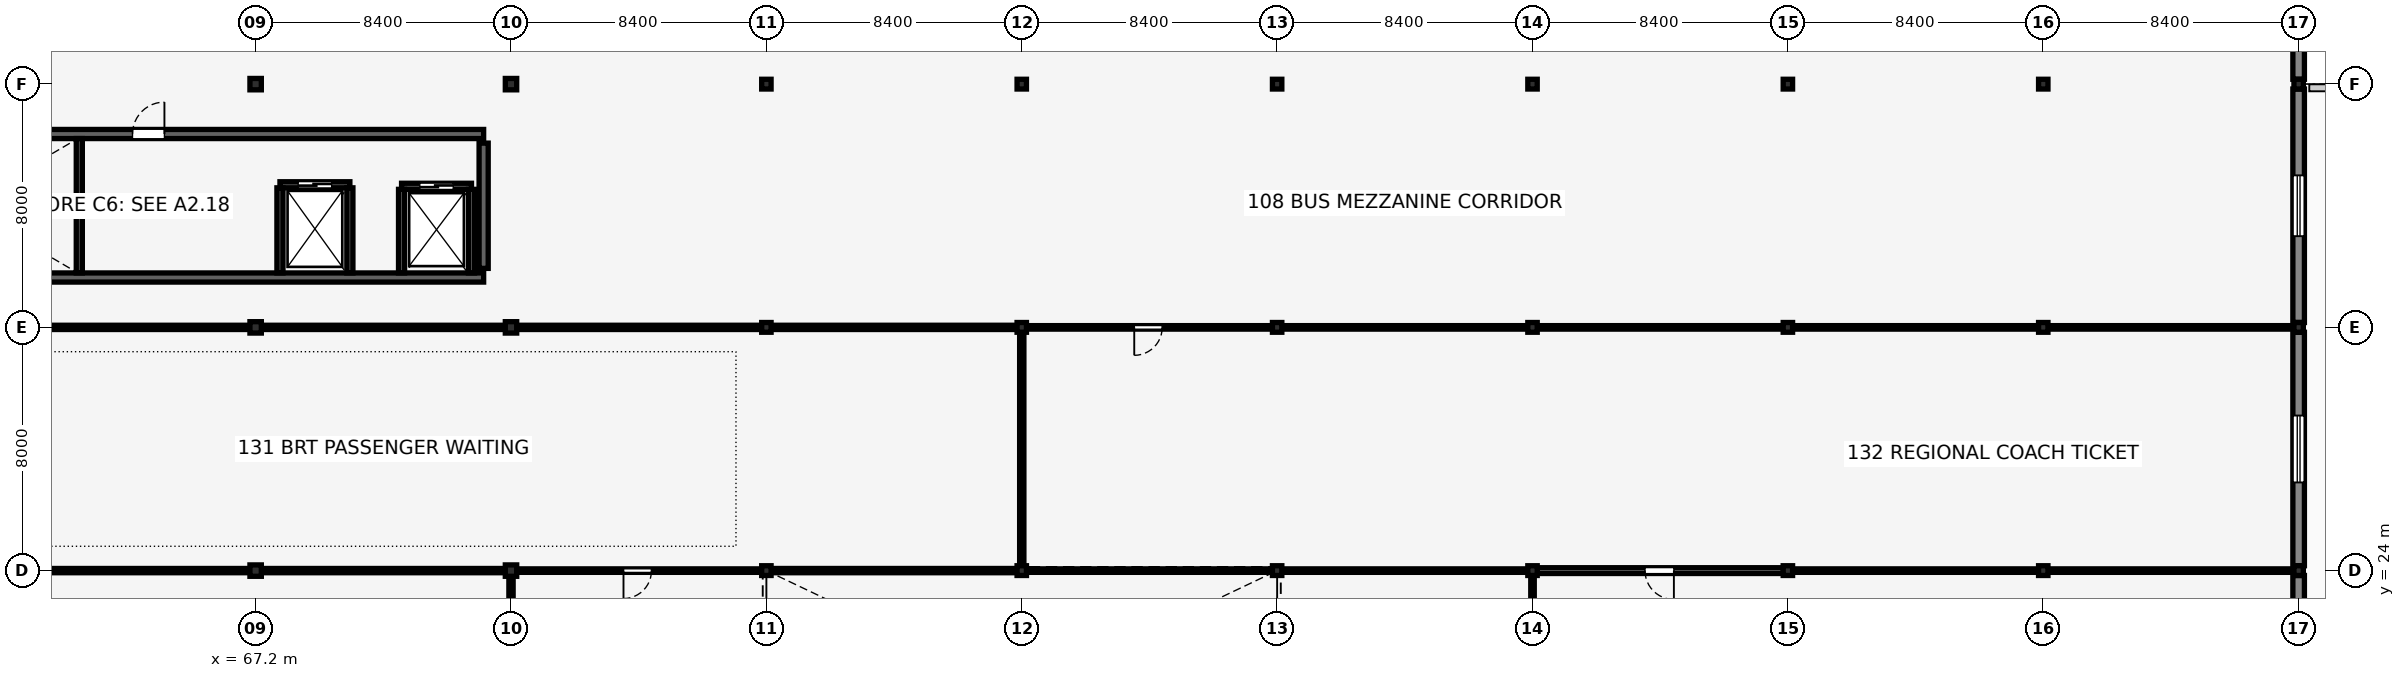
"""IFC4 building model, lengths in metres.
Left out: names, types, materials, properties, quantities, classifications, styles, units other than length and angle.
Written with IfcOpenShell. Run it as: python <this file> out.ifc"""

import sys

from ifc_helpers import new_model, si_unit, direction, frame, frame_2d, origin, origin_2d, place, context, subcontext, project, spatial, rectangle, i_section, extrude, element, fill, save


model = new_model("IFC4")
c1 = context("Model", 3, precision=1e-05, world=origin(), true_north=direction((0.0, 1.0)))
c2 = subcontext(c1, "Body", "Model", "MODEL_VIEW")
j1 = project(units=[si_unit("LENGTHUNIT", "METRE"), si_unit("PLANEANGLEUNIT", "RADIAN")], contexts=[c1])
p1 = place(None, origin())
s1 = spatial("IfcSite", under=j1, at=p1, CompositionType="ELEMENT")
p2 = place(p1, origin())
s2 = spatial("IfcBuilding", under=s1, at=p2, CompositionType="ELEMENT")
p3 = place(p2, frame((0.0, 0.0, 5.44)))
s3 = spatial("IfcBuildingStorey", under=s2, at=p3, CompositionType="ELEMENT", Elevation=5.44)
p4 = place(p3, frame((51.5, 33.64, 0.0), z_axis=(0.0, 0.0, 1.0), x_axis=(1.0, 0.0, 0.0)))
e1 = element("IfcWall", 1, at=p4, inside=s3, PredefinedType="SHEAR", context=c2, shape_type="SweptSolid", body=[
    extrude(rectangle(XDim=23.2, YDim=0.3, at=frame_2d((11.6, 0.0))), origin(), (0.0, 0.0, 1.0), 3.8),
])
p5 = place(p3, frame((51.5, 38.36, 0.0), z_axis=(0.0, 0.0, 1.0), x_axis=(1.0, 0.0, 0.0)))
e2 = element("IfcWall", 2, at=p5, inside=s3, PredefinedType="SHEAR", context=c2, shape_type="SweptSolid", body=[
    extrude(rectangle(XDim=23.2, YDim=0.3, at=frame_2d((11.6, 0.0))), origin(), (0.0, 0.0, 1.0), 3.8),
])
p6 = place(p5, frame((0.45, 0.0, 0.0), z_axis=(0.0, 0.0, 1.0), x_axis=(1.0, 0.0, 0.0)))
e3 = element("IfcOpeningElement", 3, at=p6, cuts=e2, PredefinedType="OPENING", context=c2, shape_type="SweptSolid", body=[
    extrude(rectangle(XDim=1.4, YDim=2.15, at=frame_2d((0.7, 1.075))), frame((0.0, 0.16, 0.0), z_axis=(0.0, -1.0, 0.0), x_axis=(1.0, 0.0, 0.0)), (0.0, 0.0, 1.0), 0.32),
])
p7 = place(p5, frame((11.65, 0.0, 0.0), z_axis=(0.0, 0.0, 1.0), x_axis=(1.0, 0.0, 0.0)))
e4 = element("IfcOpeningElement", 4, at=p7, cuts=e2, PredefinedType="OPENING", context=c2, shape_type="SweptSolid", body=[
    extrude(rectangle(XDim=1.05, YDim=2.15, at=frame_2d((0.525, 1.075))), frame((0.0, 0.16, 0.0), z_axis=(0.0, -1.0, 0.0), x_axis=(1.0, 0.0, 0.0)), (0.0, 0.0, 1.0), 0.32),
])
p8 = place(p3, frame((74.7, 33.94, 0.0), z_axis=(0.0, 0.0, 1.0), x_axis=(0.0, 1.0, 0.0)))
e5 = element("IfcWall", 5, at=p8, inside=s3, PredefinedType="SHEAR", context=c2, shape_type="SweptSolid", body=[
    extrude(rectangle(XDim=4.12, YDim=0.3, at=frame_2d((2.06, 0.0))), origin(), (0.0, 0.0, 1.0), 3.8),
])
for number, where, z_axis, x_axis in (
    (6, (67.2, 24.0, 0.0), (0.0, 0.0, 1.0), (1.0, 0.0, 0.0)),
    (7, (67.2, 32.0, 0.0), (0.0, 0.0, 1.0), (1.0, 0.0, 0.0)),
    (8, (67.2, 40.0, 0.0), (0.0, 0.0, 1.0), (1.0, 0.0, 0.0)),
    (9, (75.6, 24.0, 0.0), (0.0, 0.0, 1.0), (1.0, 0.0, 0.0)),
    (10, (75.6, 32.0, 0.0), (0.0, 0.0, 1.0), (1.0, 0.0, 0.0)),
    (11, (75.6, 40.0, 0.0), (0.0, 0.0, 1.0), (1.0, 0.0, 0.0)),
):
    element("IfcColumn", number, at=place(p3, frame(where, z_axis=z_axis, x_axis=x_axis)), inside=s3, PredefinedType="COLUMN", context=c2, shape_type="SweptSolid", body=[
        extrude(i_section(OverallWidth=0.375, OverallDepth=0.375, WebThickness=0.017, FlangeThickness=0.027, FilletRadius=0.015, at=origin_2d()), origin(), (0.0, 0.0, 1.0), 3.8),
    ])
for number, where, z_axis, x_axis in (
    (12, (84.0, 24.0, 0.0), (0.0, 0.0, 1.0), (1.0, 0.0, 0.0)),
    (13, (84.0, 32.0, 0.0), (0.0, 0.0, 1.0), (1.0, 0.0, 0.0)),
    (14, (84.0, 40.0, 0.0), (0.0, 0.0, 1.0), (1.0, 0.0, 0.0)),
    (15, (92.4, 24.0, 0.0), (0.0, 0.0, 1.0), (1.0, 0.0, 0.0)),
    (16, (92.4, 32.0, 0.0), (0.0, 0.0, 1.0), (1.0, 0.0, 0.0)),
    (17, (92.4, 40.0, 0.0), (0.0, 0.0, 1.0), (1.0, 0.0, 0.0)),
    (18, (100.8, 24.0, 0.0), (0.0, 0.0, 1.0), (1.0, 0.0, 0.0)),
    (19, (100.8, 32.0, 0.0), (0.0, 0.0, 1.0), (1.0, 0.0, 0.0)),
    (20, (100.8, 40.0, 0.0), (0.0, 0.0, 1.0), (1.0, 0.0, 0.0)),
    (21, (109.2, 24.0, 0.0), (0.0, 0.0, 1.0), (1.0, 0.0, 0.0)),
    (22, (109.2, 32.0, 0.0), (0.0, 0.0, 1.0), (1.0, 0.0, 0.0)),
    (23, (109.2, 40.0, 0.0), (0.0, 0.0, 1.0), (1.0, 0.0, 0.0)),
    (24, (117.6, 24.0, 0.0), (0.0, 0.0, 1.0), (1.0, 0.0, 0.0)),
    (25, (117.6, 32.0, 0.0), (0.0, 0.0, 1.0), (1.0, 0.0, 0.0)),
    (26, (117.6, 40.0, 0.0), (0.0, 0.0, 1.0), (1.0, 0.0, 0.0)),
    (27, (126.0, 24.0, 0.0), (0.0, 0.0, 1.0), (1.0, 0.0, 0.0)),
    (28, (126.0, 32.0, 0.0), (0.0, 0.0, 1.0), (1.0, 0.0, 0.0)),
    (29, (126.0, 40.0, 0.0), (0.0, 0.0, 1.0), (1.0, 0.0, 0.0)),
    (30, (134.4, 24.0, 0.0), (0.0, 0.0, 1.0), (1.0, 0.0, 0.0)),
    (31, (134.4, 32.0, 0.0), (0.0, 0.0, 1.0), (1.0, 0.0, 0.0)),
    (32, (134.4, 40.0, 0.0), (0.0, 0.0, 1.0), (1.0, 0.0, 0.0)),
):
    element("IfcColumn", number, at=place(p3, frame(where, z_axis=z_axis, x_axis=x_axis)), inside=s3, PredefinedType="COLUMN", context=c2, shape_type="SweptSolid", body=[
        extrude(i_section(OverallWidth=0.309, OverallDepth=0.321, WebThickness=0.014, FlangeThickness=0.022, FilletRadius=0.015, at=origin_2d()), origin(), (0.0, 0.0, 1.0), 3.8),
    ])
p9 = place(p3, frame((134.4, 40.16, 0.0), z_axis=(0.0, 0.0, 1.0), x_axis=(0.0, 1.0, 0.0)))
e33 = element("IfcWall", 33, at=p9, inside=s3, PredefinedType="SOLIDWALL", context=c2, shape_type="SweptSolid", body=[
    extrude(rectangle(XDim=7.679, YDim=0.38, at=frame_2d((3.84, 0.0))), origin(), (0.0, 0.0, 1.0), 3.442),
])
p10 = place(p9, frame((2.44, 0.0, 0.9), z_axis=(0.0, 0.0, 1.0), x_axis=(1.0, 0.0, 0.0)))
e34 = element("IfcOpeningElement", 34, at=p10, cuts=e33, PredefinedType="OPENING", context=c2, shape_type="SweptSolid", body=[
    extrude(rectangle(XDim=2.8, YDim=1.6, at=frame_2d((1.4, 0.8))), frame((0.0, 0.2, 0.0), z_axis=(0.0, -1.0, 0.0), x_axis=(1.0, 0.0, 0.0)), (0.0, 0.0, 1.0), 0.4),
])
p11 = place(p3, frame((134.4, 16.16, 0.0), z_axis=(0.0, 0.0, 1.0), x_axis=(0.0, 1.0, 0.0)))
e35 = element("IfcWall", 35, at=p11, inside=s3, PredefinedType="SOLIDWALL", context=c2, shape_type="SweptSolid", body=[
    extrude(rectangle(XDim=7.679, YDim=0.38, at=frame_2d((3.84, 0.0))), origin(), (0.0, 0.0, 1.0), 3.442),
])
p12 = place(p11, frame((2.64, 0.0, 0.9), z_axis=(0.0, 0.0, 1.0), x_axis=(1.0, 0.0, 0.0)))
e36 = element("IfcOpeningElement", 36, at=p12, cuts=e35, PredefinedType="OPENING", context=c2, shape_type="SweptSolid", body=[
    extrude(rectangle(XDim=2.4, YDim=1.5, at=frame_2d((1.2, 0.75))), frame((0.0, 0.2, 0.0), z_axis=(0.0, -1.0, 0.0), x_axis=(1.0, 0.0, 0.0)), (0.0, 0.0, 1.0), 0.4),
])
p13 = place(p3, frame((134.4, 24.16, 0.0), z_axis=(0.0, 0.0, 1.0), x_axis=(0.0, 1.0, 0.0)))
e37 = element("IfcWall", 37, at=p13, inside=s3, PredefinedType="SOLIDWALL", context=c2, shape_type="SweptSolid", body=[
    extrude(rectangle(XDim=7.679, YDim=0.38, at=frame_2d((3.84, 0.0))), origin(), (0.0, 0.0, 1.0), 3.442),
])
p14 = place(p13, frame((2.74, 0.0, 0.9), z_axis=(0.0, 0.0, 1.0), x_axis=(1.0, 0.0, 0.0)))
e38 = element("IfcOpeningElement", 38, at=p14, cuts=e37, PredefinedType="OPENING", context=c2, shape_type="SweptSolid", body=[
    extrude(rectangle(XDim=2.2, YDim=1.5, at=frame_2d((1.1, 0.75))), frame((0.0, 0.2, 0.0), z_axis=(0.0, -1.0, 0.0), x_axis=(1.0, 0.0, 0.0)), (0.0, 0.0, 1.0), 0.4),
])
p15 = place(p3, frame((134.4, 32.16, 0.0), z_axis=(0.0, 0.0, 1.0), x_axis=(0.0, 1.0, 0.0)))
e39 = element("IfcWall", 39, at=p15, inside=s3, PredefinedType="SOLIDWALL", context=c2, shape_type="SweptSolid", body=[
    extrude(rectangle(XDim=7.679, YDim=0.38, at=frame_2d((3.84, 0.0))), origin(), (0.0, 0.0, 1.0), 3.442),
])
p16 = place(p15, frame((2.84, 0.0, 0.9), z_axis=(0.0, 0.0, 1.0), x_axis=(1.0, 0.0, 0.0)))
e40 = element("IfcOpeningElement", 40, at=p16, cuts=e39, PredefinedType="OPENING", context=c2, shape_type="SweptSolid", body=[
    extrude(rectangle(XDim=2.0, YDim=1.5, at=frame_2d((1.0, 0.75))), frame((0.0, 0.2, 0.0), z_axis=(0.0, -1.0, 0.0), x_axis=(1.0, 0.0, 0.0)), (0.0, 0.0, 1.0), 0.4),
])
p17 = place(p3, frame((134.75, 39.88, 0.0), z_axis=(0.0, 0.0, 1.0), x_axis=(1.0, 0.0, 0.0)))
e41 = element("IfcWall", 41, at=p17, inside=s3, PredefinedType="PARAPET", context=c2, shape_type="SweptSolid", body=[
    extrude(rectangle(XDim=16.33, YDim=0.23, at=frame_2d((8.165, 0.0))), origin(), (0.0, 0.0, 1.0), 1.05),
])
p18 = place(p3, frame((61.4, 33.79, 0.0), z_axis=(0.0, 0.0, 1.0), x_axis=(0.0, 1.0, 0.0)))
e42 = element("IfcWall", 42, at=p18, inside=s3, PredefinedType="SHEAR", context=c2, shape_type="SweptSolid", body=[
    extrude(rectangle(XDim=4.42, YDim=0.2, at=frame_2d((2.21, 0.0))), origin(), (0.0, 0.0, 1.0), 3.8),
])
p19 = place(p3, frame((68.0, 36.69, 0.0), z_axis=(0.0, 0.0, 1.0), x_axis=(1.0, 0.0, 0.0)))
e43 = element("IfcWall", 43, at=p19, inside=s3, PredefinedType="SHEAR", context=c2, shape_type="SweptSolid", body=[
    extrude(rectangle(XDim=2.3, YDim=0.2, at=frame_2d((1.15, 0.0))), origin(), (0.0, 0.0, 1.0), 3.8),
])
p20 = place(p19, frame((0.6, 0.0, 0.0), z_axis=(0.0, 0.0, 1.0), x_axis=(1.0, 0.0, 0.0)))
e44 = element("IfcOpeningElement", 44, at=p20, cuts=e43, PredefinedType="OPENING", context=c2, shape_type="SweptSolid", body=[
    extrude(rectangle(XDim=1.1, YDim=2.15, at=frame_2d((0.55, 1.075))), frame((0.0, 0.11, 0.0), z_axis=(0.0, -1.0, 0.0), x_axis=(1.0, 0.0, 0.0)), (0.0, 0.0, 1.0), 0.22),
])
for number, where, z_axis, x_axis in (
    (45, (68.0, 33.79, 0.0), (0.0, 0.0, 1.0), (0.0, 1.0, 0.0)),
    (46, (70.3, 33.79, 0.0), (0.0, 0.0, 1.0), (0.0, 1.0, 0.0)),
):
    element("IfcWall", number, at=place(p3, frame(where, z_axis=z_axis, x_axis=x_axis)), inside=s3, PredefinedType="SHEAR", context=c2, shape_type="SweptSolid", body=[
        extrude(rectangle(XDim=2.8, YDim=0.2, at=frame_2d((1.4, 0.0))), origin(), (0.0, 0.0, 1.0), 3.8),
    ])
p21 = place(p3, frame((72.0, 36.64, 0.0), z_axis=(0.0, 0.0, 1.0), x_axis=(1.0, 0.0, 0.0)))
e47 = element("IfcWall", 47, at=p21, inside=s3, PredefinedType="SHEAR", context=c2, shape_type="SweptSolid", body=[
    extrude(rectangle(XDim=2.3, YDim=0.2, at=frame_2d((1.15, 0.0))), origin(), (0.0, 0.0, 1.0), 3.8),
])
p22 = place(p21, frame((0.6, 0.0, 0.0), z_axis=(0.0, 0.0, 1.0), x_axis=(1.0, 0.0, 0.0)))
e48 = element("IfcOpeningElement", 48, at=p22, cuts=e47, PredefinedType="OPENING", context=c2, shape_type="SweptSolid", body=[
    extrude(rectangle(XDim=1.1, YDim=2.15, at=frame_2d((0.55, 1.075))), frame((0.0, 0.11, 0.0), z_axis=(0.0, -1.0, 0.0), x_axis=(1.0, 0.0, 0.0)), (0.0, 0.0, 1.0), 0.22),
])
for number, where, z_axis, x_axis in (
    (49, (72.0, 33.79, 0.0), (0.0, 0.0, 1.0), (0.0, 1.0, 0.0)),
    (50, (74.3, 33.79, 0.0), (0.0, 0.0, 1.0), (0.0, 1.0, 0.0)),
):
    element("IfcWall", number, at=place(p3, frame(where, z_axis=z_axis, x_axis=x_axis)), inside=s3, PredefinedType="SHEAR", context=c2, shape_type="SweptSolid", body=[
        extrude(rectangle(XDim=2.75, YDim=0.2, at=frame_2d((1.375, 0.0))), origin(), (0.0, 0.0, 1.0), 3.8),
    ])
p23 = place(p3, frame((92.545, 32.0, 0.0), z_axis=(0.0, 0.0, 1.0), x_axis=(1.0, 0.0, 0.0)))
e51 = element("IfcWall", 51, at=p23, inside=s3, PredefinedType="PARTITIONING", context=c2, shape_type="SweptSolid", body=[
    extrude(rectangle(XDim=8.111, YDim=0.115, at=frame_2d((4.055, 0.0))), origin(), (0.0, 0.0, 1.0), 3.26),
])
p24 = place(p23, frame((4.475, 0.0, 0.0), z_axis=(0.0, 0.0, 1.0), x_axis=(-1.0, 0.0, 0.0)))
e52 = element("IfcOpeningElement", 52, at=p24, cuts=e51, PredefinedType="OPENING", context=c2, shape_type="SweptSolid", body=[
    extrude(rectangle(XDim=0.92, YDim=2.12, at=frame_2d((0.46, 1.06))), frame((0.0, 0.067, 0.0), z_axis=(0.0, -1.0, 0.0), x_axis=(1.0, 0.0, 0.0)), (0.0, 0.0, 1.0), 0.135),
])
p25 = place(p3, frame((75.777, 24.0, 0.0), z_axis=(0.0, 0.0, 1.0), x_axis=(1.0, 0.0, 0.0)))
e53 = element("IfcWall", 53, at=p25, inside=s3, PredefinedType="PARTITIONING", context=c2, shape_type="SweptSolid", body=[
    extrude(rectangle(XDim=8.078, YDim=0.115, at=frame_2d((4.039, 0.0))), origin(), (0.0, 0.0, 1.0), 3.26),
])
p26 = place(p25, frame((4.443, 0.0, 0.0), z_axis=(0.0, 0.0, 1.0), x_axis=(-1.0, 0.0, 0.0)))
e54 = element("IfcOpeningElement", 54, at=p26, cuts=e53, PredefinedType="OPENING", context=c2, shape_type="SweptSolid", body=[
    extrude(rectangle(XDim=0.92, YDim=2.12, at=frame_2d((0.46, 1.06))), frame((0.0, 0.067, 0.0), z_axis=(0.0, -1.0, 0.0), x_axis=(1.0, 0.0, 0.0)), (0.0, 0.0, 1.0), 0.135),
])
p27 = place(p3, frame((109.344, 24.0, 0.0), z_axis=(0.0, 0.0, 1.0), x_axis=(1.0, 0.0, 0.0)))
e55 = element("IfcWall", 55, at=p27, inside=s3, PredefinedType="PLUMBINGWALL", context=c2, shape_type="SweptSolid", body=[
    extrude(rectangle(XDim=8.111, YDim=0.19, at=frame_2d((4.055, 0.0))), origin(), (0.0, 0.0, 1.0), 3.26),
])
p28 = place(p27, frame((4.505, 0.0, 0.0), z_axis=(0.0, 0.0, 1.0), x_axis=(-1.0, 0.0, 0.0)))
e56 = element("IfcOpeningElement", 56, at=p28, cuts=e55, PredefinedType="OPENING", context=c2, shape_type="SweptSolid", body=[
    extrude(rectangle(XDim=0.95, YDim=2.15, at=frame_2d((0.475, 1.075))), frame((0.0, 0.105, 0.0), z_axis=(0.0, -1.0, 0.0), x_axis=(1.0, 0.0, 0.0)), (0.0, 0.0, 1.0), 0.21),
])
for number, where, z_axis, x_axis in (
    (57, (58.977, 32.0, 0.0), (0.0, 0.0, 1.0), (1.0, 0.0, 0.0)),
    (58, (67.377, 32.0, 0.0), (0.0, 0.0, 1.0), (1.0, 0.0, 0.0)),
):
    element("IfcWall", number, at=place(p3, frame(where, z_axis=z_axis, x_axis=x_axis)), inside=s3, PredefinedType="PARTITIONING", context=c2, shape_type="SweptSolid", body=[
        extrude(rectangle(XDim=8.045, YDim=0.14, at=frame_2d((4.023, 0.0))), origin(), (0.0, 0.0, 1.0), 3.26),
    ])
p29 = place(p3, frame((75.777, 32.0, 0.0), z_axis=(0.0, 0.0, 1.0), x_axis=(1.0, 0.0, 0.0)))
e59 = element("IfcWall", 59, at=p29, inside=s3, PredefinedType="PARTITIONING", context=c2, shape_type="SweptSolid", body=[
    extrude(rectangle(XDim=8.078, YDim=0.14, at=frame_2d((4.039, 0.0))), origin(), (0.0, 0.0, 1.0), 3.26),
])
p30 = place(p3, frame((84.145, 32.0, 0.0), z_axis=(0.0, 0.0, 1.0), x_axis=(1.0, 0.0, 0.0)))
e60 = element("IfcWall", 60, at=p30, inside=s3, PredefinedType="PARTITIONING", context=c2, shape_type="SweptSolid", body=[
    extrude(rectangle(XDim=8.111, YDim=0.14, at=frame_2d((4.055, 0.0))), origin(), (0.0, 0.0, 1.0), 3.26),
])
for number, where, z_axis, x_axis in (
    (61, (58.977, 24.0, 0.0), (0.0, 0.0, 1.0), (1.0, 0.0, 0.0)),
    (62, (67.377, 24.0, 0.0), (0.0, 0.0, 1.0), (1.0, 0.0, 0.0)),
):
    element("IfcWall", number, at=place(p3, frame(where, z_axis=z_axis, x_axis=x_axis)), inside=s3, PredefinedType="PARTITIONING", context=c2, shape_type="SweptSolid", body=[
        extrude(rectangle(XDim=8.045, YDim=0.14, at=frame_2d((4.023, 0.0))), origin(), (0.0, 0.0, 1.0), 3.26),
    ])
p31 = place(p3, frame((84.145, 24.0, 0.0), z_axis=(0.0, 0.0, 1.0), x_axis=(1.0, 0.0, 0.0)))
e63 = element("IfcWall", 63, at=p31, inside=s3, PredefinedType="PARTITIONING", context=c2, shape_type="SweptSolid", body=[
    extrude(rectangle(XDim=8.111, YDim=0.14, at=frame_2d((4.055, 0.0))), origin(), (0.0, 0.0, 1.0), 3.26),
])
p32 = place(p3, frame((92.4, 24.15, 0.0), z_axis=(0.0, 0.0, 1.0), x_axis=(0.0, 1.0, 0.0)))
e64 = element("IfcWall", 64, at=p32, inside=s3, PredefinedType="PARTITIONING", context=c2, shape_type="SweptSolid", body=[
    extrude(rectangle(XDim=7.699, YDim=0.14, at=frame_2d((3.85, 0.0))), origin(), (0.0, 0.0, 1.0), 3.337),
])
for number, where, z_axis, x_axis in (
    (65, (100.945, 32.0, 0.0), (0.0, 0.0, 1.0), (1.0, 0.0, 0.0)),
    (66, (109.344, 32.0, 0.0), (0.0, 0.0, 1.0), (1.0, 0.0, 0.0)),
    (67, (117.745, 32.0, 0.0), (0.0, 0.0, 1.0), (1.0, 0.0, 0.0)),
    (68, (126.145, 32.0, 0.0), (0.0, 0.0, 1.0), (1.0, 0.0, 0.0)),
    (69, (92.545, 24.0, 0.0), (0.0, 0.0, 1.0), (1.0, 0.0, 0.0)),
    (70, (100.945, 24.0, 0.0), (0.0, 0.0, 1.0), (1.0, 0.0, 0.0)),
    (71, (117.745, 24.0, 0.0), (0.0, 0.0, 1.0), (1.0, 0.0, 0.0)),
    (72, (126.145, 24.0, 0.0), (0.0, 0.0, 1.0), (1.0, 0.0, 0.0)),
):
    element("IfcWall", number, at=place(p3, frame(where, z_axis=z_axis, x_axis=x_axis)), inside=s3, PredefinedType="PARTITIONING", context=c2, shape_type="SweptSolid", body=[
        extrude(rectangle(XDim=8.111, YDim=0.115, at=frame_2d((4.055, 0.0))), origin(), (0.0, 0.0, 1.0), 3.26),
    ])
p33 = place(p3, frame((75.6, 16.15, 0.0), z_axis=(0.0, 0.0, 1.0), x_axis=(0.0, 1.0, 0.0)))
e73 = element("IfcWall", 73, at=p33, inside=s3, PredefinedType="PARTITIONING", context=c2, shape_type="SweptSolid", body=[
    extrude(rectangle(XDim=7.672, YDim=0.14, at=frame_2d((3.836, 0.0))), origin(), (0.0, 0.0, 1.0), 3.337),
])
p34 = place(p3, frame((109.2, 16.15, 0.0), z_axis=(0.0, 0.0, 1.0), x_axis=(0.0, 1.0, 0.0)))
e74 = element("IfcWall", 74, at=p34, inside=s3, PredefinedType="PARTITIONING", context=c2, shape_type="SweptSolid", body=[
    extrude(rectangle(XDim=7.699, YDim=0.115, at=frame_2d((3.85, 0.0))), origin(), (0.0, 0.0, 1.0), 3.337),
])
p35 = place(p14, origin())
e75 = element("IfcWindow", 75, at=p35, inside=s3, PartitioningType="DOUBLE_PANEL_VERTICAL", PredefinedType="WINDOW", context=c2, shape_type="SweptSolid", body=[
    extrude(rectangle(XDim=2.2, YDim=1.5, at=frame_2d((1.1, 0.75))), frame((0.0, 0.03, 0.0), z_axis=(0.0, -1.0, 0.0), x_axis=(1.0, 0.0, 0.0)), (0.0, 0.0, 1.0), 0.06),
])
fill(e38, e75)
p36 = place(p16, origin())
e76 = element("IfcWindow", 76, at=p36, inside=s3, PartitioningType="DOUBLE_PANEL_VERTICAL", PredefinedType="WINDOW", context=c2, shape_type="SweptSolid", body=[
    extrude(rectangle(XDim=2.0, YDim=1.5, at=frame_2d((1.0, 0.75))), frame((0.0, 0.03, 0.0), z_axis=(0.0, -1.0, 0.0), x_axis=(1.0, 0.0, 0.0)), (0.0, 0.0, 1.0), 0.06),
])
fill(e40, e76)
p37 = place(p7, origin())
e77 = element("IfcDoor", 77, at=p37, inside=s3, OperationType="SINGLE_SWING_RIGHT", PredefinedType="DOOR", context=c2, shape_type="SweptSolid", body=[
    extrude(rectangle(XDim=1.05, YDim=2.15, at=frame_2d((0.525, 1.075))), frame((0.0, 0.025, 0.0), z_axis=(0.0, -1.0, 0.0), x_axis=(1.0, 0.0, 0.0)), (0.0, 0.0, 1.0), 0.05),
])
fill(e4, e77)
p38 = place(p20, origin())
e78 = element("IfcDoor", 78, at=p38, inside=s3, OperationType="DOUBLE_DOOR_SLIDING", PredefinedType="DOOR", context=c2, shape_type="SweptSolid", body=[
    extrude(rectangle(XDim=1.1, YDim=2.15, at=frame_2d((0.55, 1.075))), frame((0.0, 0.025, 0.0), z_axis=(0.0, -1.0, 0.0), x_axis=(1.0, 0.0, 0.0)), (0.0, 0.0, 1.0), 0.05),
])
fill(e44, e78)
p39 = place(p22, origin())
e79 = element("IfcDoor", 79, at=p39, inside=s3, OperationType="DOUBLE_DOOR_SLIDING", PredefinedType="DOOR", context=c2, shape_type="SweptSolid", body=[
    extrude(rectangle(XDim=1.1, YDim=2.15, at=frame_2d((0.55, 1.075))), frame((0.0, 0.025, 0.0), z_axis=(0.0, -1.0, 0.0), x_axis=(1.0, 0.0, 0.0)), (0.0, 0.0, 1.0), 0.05),
])
fill(e48, e79)
p40 = place(p24, origin())
e80 = element("IfcDoor", 80, at=p40, inside=s3, OperationType="SINGLE_SWING_RIGHT", PredefinedType="DOOR", context=c2, shape_type="SweptSolid", body=[
    extrude(rectangle(XDim=0.92, YDim=2.12, at=frame_2d((0.46, 1.06))), frame((0.0, 0.025, 0.0), z_axis=(0.0, -1.0, 0.0), x_axis=(1.0, 0.0, 0.0)), (0.0, 0.0, 1.0), 0.05),
])
fill(e52, e80)
p41 = place(p26, origin())
e81 = element("IfcDoor", 81, at=p41, inside=s3, OperationType="SINGLE_SWING_RIGHT", PredefinedType="DOOR", context=c2, shape_type="SweptSolid", body=[
    extrude(rectangle(XDim=0.92, YDim=2.12, at=frame_2d((0.46, 1.06))), frame((0.0, 0.025, 0.0), z_axis=(0.0, -1.0, 0.0), x_axis=(1.0, 0.0, 0.0)), (0.0, 0.0, 1.0), 0.05),
])
fill(e54, e81)
p42 = place(p28, origin())
e82 = element("IfcDoor", 82, at=p42, inside=s3, OperationType="SINGLE_SWING_LEFT", PredefinedType="DOOR", context=c2, shape_type="SweptSolid", body=[
    extrude(rectangle(XDim=0.95, YDim=2.15, at=frame_2d((0.475, 1.075))), frame((0.0, 0.025, 0.0), z_axis=(0.0, -1.0, 0.0), x_axis=(1.0, 0.0, 0.0)), (0.0, 0.0, 1.0), 0.05),
])
fill(e56, e82)
save(model, sys.argv[1])
